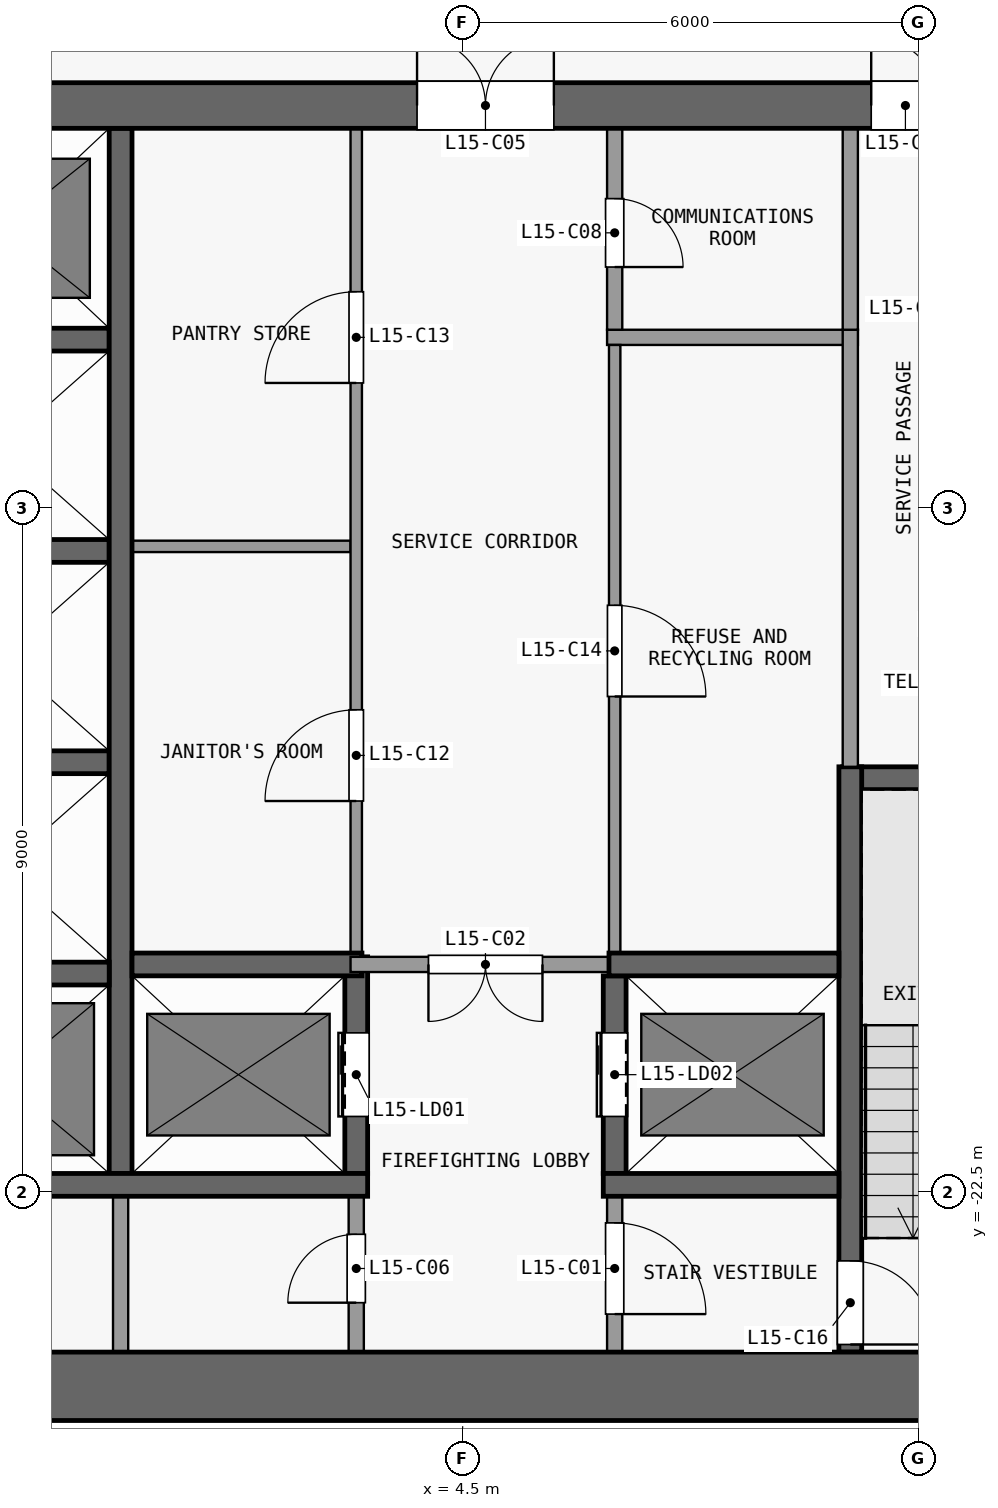
"""IFC4 building model, lengths in metres.
Left out: names, types, materials, properties, quantities, classifications, styles, units other than length and angle.
Written with IfcOpenShell. Run it as: python <this file> out.ifc"""

import sys

from ifc_helpers import new_model, si_unit, direction, frame, frame_2d, origin, place, context, subcontext, project, spatial, rectangle, extrude, element, fill, save


model = new_model("IFC4")
c1 = context("Model", 3, precision=1e-05, world=origin(), true_north=direction((0.0, 1.0)))
c2 = subcontext(c1, "Body", "Model", "MODEL_VIEW")
j1 = project(units=[si_unit("LENGTHUNIT", "METRE"), si_unit("PLANEANGLEUNIT", "RADIAN")], contexts=[c1])
p1 = place(None, origin())
s1 = spatial("IfcSite", under=j1, at=p1, CompositionType="ELEMENT")
p2 = place(p1, origin())
s2 = spatial("IfcBuilding", under=s1, at=p2, CompositionType="ELEMENT")
p3 = place(p2, frame((0.0, 0.0, 64.9)))
s3 = spatial("IfcBuildingStorey", under=s2, at=p3, CompositionType="ELEMENT", Elevation=64.9)
p4 = place(p3, frame((-13.5, -25.05, 0.0), z_axis=(0.0, 0.0, 1.0), x_axis=(1.0, 0.0, 0.0)))
e1 = element("IfcWall", 1, at=p4, inside=s3, PredefinedType="SHEAR", context=c2, shape_type="SweptSolid", body=[
    extrude(rectangle(XDim=27.0, YDim=0.9, at=frame_2d((13.5, 0.0))), origin(), (0.0, 0.0, 1.0), 3.3),
])
p5 = place(p3, frame((-13.5, -8.2, 0.0), z_axis=(0.0, 0.0, 1.0), x_axis=(1.0, 0.0, 0.0)))
e2 = element("IfcWall", 2, at=p5, inside=s3, PredefinedType="SHEAR", context=c2, shape_type="SweptSolid", body=[
    extrude(rectangle(XDim=27.0, YDim=0.6, at=frame_2d((13.5, 0.0))), origin(), (0.0, 0.0, 1.0), 3.3),
])
p6 = place(p5, frame((7.8, 0.0, 0.0)))
e3 = element("IfcOpeningElement", 3, at=p6, cuts=e2, PredefinedType="OPENING", context=c2, shape_type="SweptSolid", body=[
    extrude(rectangle(XDim=1.8, YDim=2.1, at=frame_2d((0.9, 1.05))), frame((0.0, 0.31, 0.0), z_axis=(0.0, -1.0, 0.0), x_axis=(1.0, 0.0, 0.0)), (0.0, 0.0, 1.0), 0.62),
])
p7 = place(p5, frame((17.4, 0.0, 0.0)))
e4 = element("IfcOpeningElement", 4, at=p7, cuts=e2, PredefinedType="OPENING", context=c2, shape_type="SweptSolid", body=[
    extrude(rectangle(XDim=1.8, YDim=2.1, at=frame_2d((0.9, 1.05))), frame((0.0, 0.31, 0.0), z_axis=(0.0, -1.0, 0.0), x_axis=(1.0, 0.0, 0.0)), (0.0, 0.0, 1.0), 0.62),
])
p8 = place(p5, frame((1.725, 0.0, 0.0)))
e5 = element("IfcOpeningElement", 5, at=p8, cuts=e2, PredefinedType="OPENING", context=c2, shape_type="SweptSolid", body=[
    extrude(rectangle(XDim=1.2, YDim=2.1, at=frame_2d((0.6, 1.05))), frame((0.0, 0.31, 0.0), z_axis=(0.0, -1.0, 0.0), x_axis=(1.0, 0.0, 0.0)), (0.0, 0.0, 1.0), 0.62),
])
p9 = place(p5, frame((23.375, 0.0, 0.0)))
e6 = element("IfcOpeningElement", 6, at=p9, cuts=e2, PredefinedType="OPENING", context=c2, shape_type="SweptSolid", body=[
    extrude(rectangle(XDim=0.9, YDim=2.1, at=frame_2d((0.45, 1.05))), frame((0.0, 0.31, 0.0), z_axis=(0.0, -1.0, 0.0), x_axis=(1.0, 0.0, 0.0)), (0.0, 0.0, 1.0), 0.62),
])
p10 = place(p3, frame((-2.95, -22.4, 0.0), z_axis=(0.0, 0.0, 1.0), x_axis=(1.0, 0.0, 0.0)))
e7 = element("IfcWall", 7, at=p10, inside=s3, PredefinedType="SHEAR", context=c2, shape_type="SweptSolid", body=[
    extrude(rectangle(XDim=6.2, YDim=0.3, at=frame_2d((3.1, 0.0))), origin(), (0.0, 0.0, 1.0), 3.3),
])
p11 = place(p3, frame((6.35, -22.4, 0.0), z_axis=(0.0, 0.0, 1.0), x_axis=(1.0, 0.0, 0.0)))
e8 = element("IfcWall", 8, at=p11, inside=s3, PredefinedType="SHEAR", context=c2, shape_type="SweptSolid", body=[
    extrude(rectangle(XDim=3.1, YDim=0.3, at=frame_2d((1.55, 0.0))), origin(), (0.0, 0.0, 1.0), 3.3),
])
p12 = place(p3, frame((-2.95, -19.62, 0.0), z_axis=(0.0, 0.0, 1.0), x_axis=(1.0, 0.0, 0.0)))
e9 = element("IfcWall", 9, at=p12, inside=s3, PredefinedType="SHEAR", context=c2, shape_type="SweptSolid", body=[
    extrude(rectangle(XDim=2.8, YDim=0.3, at=frame_2d((1.4, 0.0))), origin(), (0.0, 0.0, 1.0), 3.3),
])
p13 = place(p3, frame((0.15, -19.5, 0.0), z_axis=(0.0, 0.0, 1.0), x_axis=(1.0, 0.0, 0.0)))
e10 = element("IfcWall", 10, at=p13, inside=s3, PredefinedType="SHEAR", context=c2, shape_type="SweptSolid", body=[
    extrude(rectangle(XDim=3.025, YDim=0.3, at=frame_2d((1.513, 0.0))), origin(), (0.0, 0.0, 1.0), 3.3),
])
p14 = place(p3, frame((6.575, -19.5, 0.0), z_axis=(0.0, 0.0, 1.0), x_axis=(-1.0, 0.0, 0.0)))
e11 = element("IfcWall", 11, at=p14, inside=s3, PredefinedType="PARTITIONING", context=c2, shape_type="SweptSolid", body=[
    extrude(rectangle(XDim=3.55, YDim=0.2, at=frame_2d((1.775, 0.0))), origin(), (0.0, 0.0, 1.0), 3.3),
])
p15 = place(p14, frame((1.025, 0.0, 0.0)))
e12 = element("IfcOpeningElement", 12, at=p15, cuts=e11, PredefinedType="OPENING", context=c2, shape_type="SweptSolid", body=[
    extrude(rectangle(XDim=1.5, YDim=2.1, at=frame_2d((0.75, 1.05))), frame((0.0, 0.11, 0.0), z_axis=(0.0, -1.0, 0.0), x_axis=(1.0, 0.0, 0.0)), (0.0, 0.0, 1.0), 0.22),
])
p16 = place(p3, frame((6.425, -19.5, 0.0), z_axis=(0.0, 0.0, 1.0), x_axis=(1.0, 0.0, 0.0)))
e13 = element("IfcWall", 13, at=p16, inside=s3, PredefinedType="SHEAR", context=c2, shape_type="SweptSolid", body=[
    extrude(rectangle(XDim=3.025, YDim=0.3, at=frame_2d((1.512, 0.0))), origin(), (0.0, 0.0, 1.0), 3.3),
])
p17 = place(p3, frame((9.5, -17.05, 0.0), z_axis=(0.0, 0.0, 1.0), x_axis=(1.0, 0.0, 0.0)))
e14 = element("IfcWall", 14, at=p17, inside=s3, PredefinedType="SHEAR", context=c2, shape_type="SweptSolid", body=[
    extrude(rectangle(XDim=3.1, YDim=0.3, at=frame_2d((1.55, 0.0))), origin(), (0.0, 0.0, 1.0), 3.3),
])
for number, where, z_axis, x_axis in (
    (15, (-2.95, -16.84, 0.0), (0.0, 0.0, 1.0), (1.0, 0.0, 0.0)),
    (16, (-2.95, -14.06, 0.0), (0.0, 0.0, 1.0), (1.0, 0.0, 0.0)),
):
    element("IfcWall", number, at=place(p3, frame(where, z_axis=z_axis, x_axis=x_axis)), inside=s3, PredefinedType="SHEAR", context=c2, shape_type="SweptSolid", body=[
        extrude(rectangle(XDim=2.8, YDim=0.3, at=frame_2d((1.4, 0.0))), origin(), (0.0, 0.0, 1.0), 3.3),
    ])
p18 = place(p3, frame((0.15, -14.0, 0.0), z_axis=(0.0, 0.0, 1.0), x_axis=(1.0, 0.0, 0.0)))
e17 = element("IfcWall", 17, at=p18, inside=s3, PredefinedType="PARTITIONING", context=c2, shape_type="SweptSolid", body=[
    extrude(rectangle(XDim=2.875, YDim=0.15, at=frame_2d((1.438, 0.0))), origin(), (0.0, 0.0, 1.0), 3.3),
])
p19 = place(p3, frame((-2.95, -11.28, 0.0), z_axis=(0.0, 0.0, 1.0), x_axis=(1.0, 0.0, 0.0)))
e18 = element("IfcWall", 18, at=p19, inside=s3, PredefinedType="SHEAR", context=c2, shape_type="SweptSolid", body=[
    extrude(rectangle(XDim=2.8, YDim=0.3, at=frame_2d((1.4, 0.0))), origin(), (0.0, 0.0, 1.0), 3.3),
])
p20 = place(p3, frame((6.4, -11.25, 0.0), z_axis=(0.0, 0.0, 1.0), x_axis=(1.0, 0.0, 0.0)))
e19 = element("IfcWall", 19, at=p20, inside=s3, PredefinedType="PARTITIONING", context=c2, shape_type="SweptSolid", body=[
    extrude(rectangle(XDim=3.3, YDim=0.2, at=frame_2d((1.65, 0.0))), origin(), (0.0, 0.0, 1.0), 3.3),
])
p21 = place(p3, frame((0.0, -24.6, 0.0), z_axis=(0.0, 0.0, 1.0), x_axis=(0.0, 1.0, 0.0)))
e20 = element("IfcWall", 20, at=p21, inside=s3, PredefinedType="PARTITIONING", context=c2, shape_type="SweptSolid", body=[
    extrude(rectangle(XDim=2.05, YDim=0.2, at=frame_2d((1.025, 0.0))), origin(), (0.0, 0.0, 1.0), 3.3),
])
p22 = place(p3, frame((0.0, -22.25, 0.0), z_axis=(0.0, 0.0, 1.0), x_axis=(0.0, 1.0, 0.0)))
e21 = element("IfcWall", 21, at=p22, inside=s3, PredefinedType="SHEAR", context=c2, shape_type="SweptSolid", body=[
    extrude(rectangle(XDim=13.75, YDim=0.3, at=frame_2d((6.875, 0.0))), origin(), (0.0, 0.0, 1.0), 3.3),
])
p23 = place(p3, frame((3.1, -24.6, 0.0), z_axis=(0.0, 0.0, 1.0), x_axis=(0.0, 1.0, 0.0)))
e22 = element("IfcWall", 22, at=p23, inside=s3, PredefinedType="PARTITIONING", context=c2, shape_type="SweptSolid", body=[
    extrude(rectangle(XDim=2.05, YDim=0.2, at=frame_2d((1.025, 0.0))), origin(), (0.0, 0.0, 1.0), 3.3),
])
p24 = place(p23, frame((0.65, 0.0, 0.0)))
e23 = element("IfcOpeningElement", 23, at=p24, cuts=e22, PredefinedType="OPENING", context=c2, shape_type="SweptSolid", body=[
    extrude(rectangle(XDim=0.9, YDim=2.1, at=frame_2d((0.45, 1.05))), frame((0.0, 0.11, 0.0), z_axis=(0.0, -1.0, 0.0), x_axis=(1.0, 0.0, 0.0)), (0.0, 0.0, 1.0), 0.22),
])
p25 = place(p3, frame((3.1, -22.25, 0.0), z_axis=(0.0, 0.0, 1.0), x_axis=(0.0, 1.0, 0.0)))
e24 = element("IfcWall", 24, at=p25, inside=s3, PredefinedType="SHEAR", context=c2, shape_type="SweptSolid", body=[
    extrude(rectangle(XDim=2.85, YDim=0.3, at=frame_2d((1.425, 0.0))), origin(), (0.0, 0.0, 1.0), 3.3),
])
p26 = place(p25, frame((0.75, 0.0, 0.0)))
e25 = element("IfcOpeningElement", 25, at=p26, cuts=e24, PredefinedType="OPENING", context=c2, shape_type="SweptSolid", body=[
    extrude(rectangle(XDim=1.1, YDim=2.1, at=frame_2d((0.55, 1.05))), frame((0.0, 0.16, 0.0), z_axis=(0.0, -1.0, 0.0), x_axis=(1.0, 0.0, 0.0)), (0.0, 0.0, 1.0), 0.32),
])
p27 = place(p3, frame((3.1, -19.4, 0.0), z_axis=(0.0, 0.0, 1.0), x_axis=(0.0, 1.0, 0.0)))
e26 = element("IfcWall", 26, at=p27, inside=s3, PredefinedType="PARTITIONING", context=c2, shape_type="SweptSolid", body=[
    extrude(rectangle(XDim=10.9, YDim=0.15, at=frame_2d((5.45, 0.0))), origin(), (0.0, 0.0, 1.0), 3.3),
])
p28 = place(p27, frame((2.05, 0.0, 0.0)))
e27 = element("IfcOpeningElement", 27, at=p28, cuts=e26, PredefinedType="OPENING", context=c2, shape_type="SweptSolid", body=[
    extrude(rectangle(XDim=1.2, YDim=2.1, at=frame_2d((0.6, 1.05))), frame((0.0, 0.085, 0.0), z_axis=(0.0, -1.0, 0.0), x_axis=(1.0, 0.0, 0.0)), (0.0, 0.0, 1.0), 0.17),
])
p29 = place(p27, frame((7.55, 0.0, 0.0)))
e28 = element("IfcOpeningElement", 28, at=p29, cuts=e26, PredefinedType="OPENING", context=c2, shape_type="SweptSolid", body=[
    extrude(rectangle(XDim=1.2, YDim=2.1, at=frame_2d((0.6, 1.05))), frame((0.0, 0.085, 0.0), z_axis=(0.0, -1.0, 0.0), x_axis=(1.0, 0.0, 0.0)), (0.0, 0.0, 1.0), 0.17),
])
p30 = place(p3, frame((6.5, -22.55, 0.0), z_axis=(0.0, 0.0, 1.0), x_axis=(0.0, -1.0, 0.0)))
e29 = element("IfcWall", 29, at=p30, inside=s3, PredefinedType="PARTITIONING", context=c2, shape_type="SweptSolid", body=[
    extrude(rectangle(XDim=2.05, YDim=0.2, at=frame_2d((1.025, 0.0))), origin(), (0.0, 0.0, 1.0), 3.3),
])
p31 = place(p30, frame((0.35, 0.0, 0.0)))
e30 = element("IfcOpeningElement", 30, at=p31, cuts=e29, PredefinedType="OPENING", context=c2, shape_type="SweptSolid", body=[
    extrude(rectangle(XDim=1.2, YDim=2.1, at=frame_2d((0.6, 1.05))), frame((0.0, 0.11, 0.0), z_axis=(0.0, -1.0, 0.0), x_axis=(1.0, 0.0, 0.0)), (0.0, 0.0, 1.0), 0.22),
])
p32 = place(p3, frame((6.5, -22.25, 0.0), z_axis=(0.0, 0.0, 1.0), x_axis=(0.0, 1.0, 0.0)))
e31 = element("IfcWall", 31, at=p32, inside=s3, PredefinedType="SHEAR", context=c2, shape_type="SweptSolid", body=[
    extrude(rectangle(XDim=2.6, YDim=0.3, at=frame_2d((1.3, 0.0))), origin(), (0.0, 0.0, 1.0), 3.3),
])
p33 = place(p32, frame((0.75, 0.0, 0.0)))
e32 = element("IfcOpeningElement", 32, at=p33, cuts=e31, PredefinedType="OPENING", context=c2, shape_type="SweptSolid", body=[
    extrude(rectangle(XDim=1.1, YDim=2.1, at=frame_2d((0.55, 1.05))), frame((0.0, 0.16, 0.0), z_axis=(0.0, -1.0, 0.0), x_axis=(1.0, 0.0, 0.0)), (0.0, 0.0, 1.0), 0.32),
])
p34 = place(p3, frame((6.5, -11.35, 0.0), z_axis=(0.0, 0.0, 1.0), x_axis=(0.0, -1.0, 0.0)))
e33 = element("IfcWall", 33, at=p34, inside=s3, PredefinedType="PARTITIONING", context=c2, shape_type="SweptSolid", body=[
    extrude(rectangle(XDim=8.0, YDim=0.15, at=frame_2d((4.0, 0.0))), origin(), (0.0, 0.0, 1.0), 3.3),
])
p35 = place(p34, frame((3.425, 0.0, 0.0)))
e34 = element("IfcOpeningElement", 34, at=p35, cuts=e33, PredefinedType="OPENING", context=c2, shape_type="SweptSolid", body=[
    extrude(rectangle(XDim=1.2, YDim=2.1, at=frame_2d((0.6, 1.05))), frame((0.0, 0.085, 0.0), z_axis=(0.0, -1.0, 0.0), x_axis=(1.0, 0.0, 0.0)), (0.0, 0.0, 1.0), 0.17),
])
p36 = place(p3, frame((6.5, -8.5, 0.0), z_axis=(0.0, 0.0, 1.0), x_axis=(0.0, -1.0, 0.0)))
e35 = element("IfcWall", 35, at=p36, inside=s3, PredefinedType="PARTITIONING", context=c2, shape_type="SweptSolid", body=[
    extrude(rectangle(XDim=2.65, YDim=0.2, at=frame_2d((1.325, 0.0))), origin(), (0.0, 0.0, 1.0), 3.3),
])
p37 = place(p36, frame((0.925, 0.0, 0.0)))
e36 = element("IfcOpeningElement", 36, at=p37, cuts=e35, PredefinedType="OPENING", context=c2, shape_type="SweptSolid", body=[
    extrude(rectangle(XDim=0.9, YDim=2.1, at=frame_2d((0.45, 1.05))), frame((0.0, 0.11, 0.0), z_axis=(0.0, -1.0, 0.0), x_axis=(1.0, 0.0, 0.0)), (0.0, 0.0, 1.0), 0.22),
])
p38 = place(p3, frame((9.6, -16.9, 0.0), z_axis=(0.0, 0.0, 1.0), x_axis=(0.0, -1.0, 0.0)))
e37 = element("IfcWall", 37, at=p38, inside=s3, PredefinedType="SHEAR", context=c2, shape_type="SweptSolid", body=[
    extrude(rectangle(XDim=7.7, YDim=0.3, at=frame_2d((3.85, 0.0))), origin(), (0.0, 0.0, 1.0), 3.3),
])
p39 = place(p38, frame((6.5, 0.0, 0.0)))
e38 = element("IfcOpeningElement", 38, at=p39, cuts=e37, PredefinedType="OPENING", context=c2, shape_type="SweptSolid", body=[
    extrude(rectangle(XDim=1.1, YDim=2.1, at=frame_2d((0.55, 1.05))), frame((0.0, 0.16, 0.0), z_axis=(0.0, -1.0, 0.0), x_axis=(1.0, 0.0, 0.0)), (0.0, 0.0, 1.0), 0.32),
])
p40 = place(p3, frame((9.6, -16.9, 0.0), z_axis=(0.0, 0.0, 1.0), x_axis=(0.0, 1.0, 0.0)))
e39 = element("IfcWall", 39, at=p40, inside=s3, PredefinedType="PARTITIONING", context=c2, shape_type="SweptSolid", body=[
    extrude(rectangle(XDim=5.75, YDim=0.2, at=frame_2d((2.875, 0.0))), origin(), (0.0, 0.0, 1.0), 3.3),
])
p41 = place(p3, frame((9.6, -11.15, 0.0), z_axis=(0.0, 0.0, 1.0), x_axis=(0.0, 1.0, 0.0)))
e40 = element("IfcWall", 40, at=p41, inside=s3, PredefinedType="PARTITIONING", context=c2, shape_type="SweptSolid", body=[
    extrude(rectangle(XDim=2.65, YDim=0.2, at=frame_2d((1.325, 0.0))), origin(), (0.0, 0.0, 1.0), 3.3),
])
p42 = place(p26, origin())
e41 = element("IfcDoor", 41, at=p42, inside=s3, OperationType="DOUBLE_DOOR_SLIDING", PredefinedType="DOOR", context=c2, shape_type="SweptSolid", body=[
    extrude(rectangle(XDim=1.1, YDim=2.1, at=frame_2d((0.55, 1.05))), frame((0.0, 0.025, 0.0), z_axis=(0.0, -1.0, 0.0), x_axis=(1.0, 0.0, 0.0)), (0.0, 0.0, 1.0), 0.05),
])
fill(e25, e41)
p43 = place(p33, origin())
e42 = element("IfcDoor", 42, at=p43, inside=s3, OperationType="DOUBLE_DOOR_SLIDING", PredefinedType="DOOR", context=c2, shape_type="SweptSolid", body=[
    extrude(rectangle(XDim=1.1, YDim=2.1, at=frame_2d((0.55, 1.05))), frame((0.0, 0.025, 0.0), z_axis=(0.0, -1.0, 0.0), x_axis=(1.0, 0.0, 0.0)), (0.0, 0.0, 1.0), 0.05),
])
fill(e32, e42)
p44 = place(p31, origin())
e43 = element("IfcDoor", 43, at=p44, inside=s3, OperationType="SINGLE_SWING_RIGHT", PredefinedType="DOOR", context=c2, shape_type="SweptSolid", body=[
    extrude(rectangle(XDim=1.2, YDim=2.1, at=frame_2d((0.6, 1.05))), frame((0.0, 0.025, 0.0), z_axis=(0.0, -1.0, 0.0), x_axis=(1.0, 0.0, 0.0)), (0.0, 0.0, 1.0), 0.05),
])
fill(e30, e43)
p45 = place(p15, origin())
e44 = element("IfcDoor", 44, at=p45, inside=s3, OperationType="DOUBLE_DOOR_SINGLE_SWING", PredefinedType="DOOR", context=c2, shape_type="SweptSolid", body=[
    extrude(rectangle(XDim=1.5, YDim=2.1, at=frame_2d((0.75, 1.05))), frame((0.0, 0.025, 0.0), z_axis=(0.0, -1.0, 0.0), x_axis=(1.0, 0.0, 0.0)), (0.0, 0.0, 1.0), 0.05),
])
fill(e12, e44)
p46 = place(p7, origin())
e45 = element("IfcDoor", 45, at=p46, inside=s3, OperationType="DOUBLE_DOOR_SINGLE_SWING", PredefinedType="DOOR", context=c2, shape_type="SweptSolid", body=[
    extrude(rectangle(XDim=1.8, YDim=2.1, at=frame_2d((0.9, 1.05))), frame((0.0, 0.025, 0.0), z_axis=(0.0, -1.0, 0.0), x_axis=(1.0, 0.0, 0.0)), (0.0, 0.0, 1.0), 0.05),
])
fill(e4, e45)
p47 = place(p24, origin())
e46 = element("IfcDoor", 46, at=p47, inside=s3, OperationType="SINGLE_SWING_LEFT", PredefinedType="DOOR", context=c2, shape_type="SweptSolid", body=[
    extrude(rectangle(XDim=0.9, YDim=2.1, at=frame_2d((0.45, 1.05))), frame((0.0, 0.025, 0.0), z_axis=(0.0, -1.0, 0.0), x_axis=(1.0, 0.0, 0.0)), (0.0, 0.0, 1.0), 0.05),
])
fill(e23, e46)
p48 = place(p37, origin())
e47 = element("IfcDoor", 47, at=p48, inside=s3, OperationType="SINGLE_SWING_RIGHT", PredefinedType="DOOR", context=c2, shape_type="SweptSolid", body=[
    extrude(rectangle(XDim=0.9, YDim=2.1, at=frame_2d((0.45, 1.05))), frame((0.0, 0.025, 0.0), z_axis=(0.0, -1.0, 0.0), x_axis=(1.0, 0.0, 0.0)), (0.0, 0.0, 1.0), 0.05),
])
fill(e36, e47)
p49 = place(p9, origin())
e48 = element("IfcDoor", 48, at=p49, inside=s3, OperationType="SINGLE_SWING_LEFT", PredefinedType="DOOR", context=c2, shape_type="SweptSolid", body=[
    extrude(rectangle(XDim=0.9, YDim=2.1, at=frame_2d((0.45, 1.05))), frame((0.0, 0.025, 0.0), z_axis=(0.0, -1.0, 0.0), x_axis=(1.0, 0.0, 0.0)), (0.0, 0.0, 1.0), 0.05),
])
fill(e6, e48)
p50 = place(p28, origin())
e49 = element("IfcDoor", 49, at=p50, inside=s3, OperationType="SINGLE_SWING_LEFT", PredefinedType="DOOR", context=c2, shape_type="SweptSolid", body=[
    extrude(rectangle(XDim=1.2, YDim=2.1, at=frame_2d((0.6, 1.05))), frame((0.0, 0.025, 0.0), z_axis=(0.0, -1.0, 0.0), x_axis=(1.0, 0.0, 0.0)), (0.0, 0.0, 1.0), 0.05),
])
fill(e27, e49)
p51 = place(p29, origin())
e50 = element("IfcDoor", 50, at=p51, inside=s3, OperationType="SINGLE_SWING_LEFT", PredefinedType="DOOR", context=c2, shape_type="SweptSolid", body=[
    extrude(rectangle(XDim=1.2, YDim=2.1, at=frame_2d((0.6, 1.05))), frame((0.0, 0.025, 0.0), z_axis=(0.0, -1.0, 0.0), x_axis=(1.0, 0.0, 0.0)), (0.0, 0.0, 1.0), 0.05),
])
fill(e28, e50)
p52 = place(p35, origin())
e51 = element("IfcDoor", 51, at=p52, inside=s3, OperationType="SINGLE_SWING_RIGHT", PredefinedType="DOOR", context=c2, shape_type="SweptSolid", body=[
    extrude(rectangle(XDim=1.2, YDim=2.1, at=frame_2d((0.6, 1.05))), frame((0.0, 0.025, 0.0), z_axis=(0.0, -1.0, 0.0), x_axis=(1.0, 0.0, 0.0)), (0.0, 0.0, 1.0), 0.05),
])
fill(e34, e51)
p53 = place(p39, origin())
e52 = element("IfcDoor", 52, at=p53, inside=s3, OperationType="SINGLE_SWING_RIGHT", PredefinedType="DOOR", context=c2, shape_type="SweptSolid", body=[
    extrude(rectangle(XDim=1.1, YDim=2.1, at=frame_2d((0.55, 1.05))), frame((0.0, 0.025, 0.0), z_axis=(0.0, -1.0, 0.0), x_axis=(1.0, 0.0, 0.0)), (0.0, 0.0, 1.0), 0.05),
])
fill(e38, e52)
save(model, sys.argv[1])
